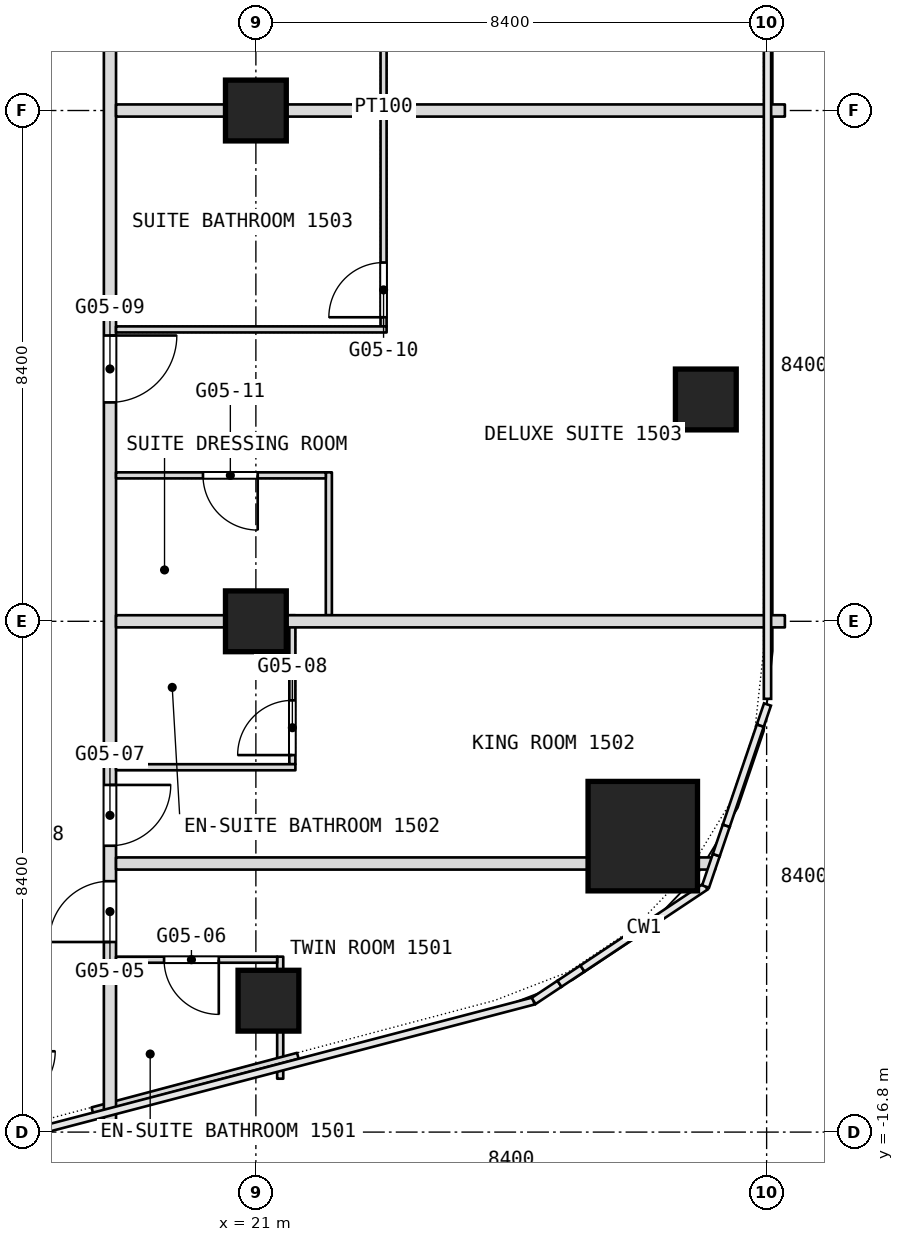
"""IFC4 building model, lengths in metres.
Left out: names, types, materials, properties, quantities, classifications, styles, units other than length and angle.
Written with IfcOpenShell. Run it as: python <this file> out.ifc"""

import sys

from ifc_helpers import new_model, si_unit, direction, frame, frame_2d, origin, origin_2d, place, context, subcontext, project, spatial, rectangle, extrude, element, fill, save


model = new_model("IFC4")
c1 = context("Model", 3, precision=1e-05, world=origin(), true_north=direction((0.0, 1.0)))
c2 = subcontext(c1, "Body", "Model", "MODEL_VIEW")
j1 = project(units=[si_unit("LENGTHUNIT", "METRE"), si_unit("PLANEANGLEUNIT", "RADIAN")], contexts=[c1])
p1 = place(None, origin())
s1 = spatial("IfcSite", under=j1, at=p1, CompositionType="ELEMENT")
p2 = place(p1, origin())
s2 = spatial("IfcBuilding", under=s1, at=p2, CompositionType="ELEMENT")
p3 = place(p2, frame((0.0, 0.0, 68.9)))
s3 = spatial("IfcBuildingStorey", under=s2, at=p3, CompositionType="ELEMENT", Elevation=68.9)
p4 = place(p3, frame((27.363, -11.933, 0.0), z_axis=(0.0, 0.0, 1.0), x_axis=(1.0, 0.0, 0.0)))
e1 = element("IfcColumn", 1, at=p4, inside=s3, PredefinedType="COLUMN", context=c2, shape_type="SweptSolid", body=[
    extrude(rectangle(XDim=1.8, YDim=1.8, at=origin_2d()), origin(), (0.0, 0.0, 1.0), 3.6),
])
for number, where, z_axis, x_axis in (
    (2, (21.0, -8.4, 0.0), (0.0, 0.0, 1.0), (1.0, 0.0, 0.0)),
    (3, (21.0, 0.0, 0.0), (0.0, 0.0, 1.0), (1.0, 0.0, 0.0)),
    (4, (28.4, -4.752, 0.0), (0.0, 0.0, 1.0), (1.0, 0.0, 0.0)),
    (5, (21.207, -14.639, 0.0), (0.0, 0.0, 1.0), (1.0, 0.0, 0.0)),
):
    element("IfcColumn", number, at=place(p3, frame(where, z_axis=z_axis, x_axis=x_axis)), inside=s3, PredefinedType="COLUMN", context=c2, shape_type="SweptSolid", body=[
        extrude(rectangle(XDim=1.0, YDim=1.0, at=origin_2d()), origin(), (0.0, 0.0, 1.0), 3.6),
    ])
p5 = place(p3, frame((23.1, -3.55, 0.0), z_axis=(0.0, 0.0, 1.0), x_axis=(0.0, 1.0, 0.0)))
e6 = element("IfcWall", 6, at=p5, inside=s3, PredefinedType="PARTITIONING", context=c2, shape_type="SweptSolid", body=[
    extrude(rectangle(XDim=7.2, YDim=0.1, at=frame_2d((3.6, 0.0))), origin(), (0.0, 0.0, 1.0), 3.34),
])
p6 = place(p5, frame((0.15, 0.0, 0.0)))
e7 = element("IfcOpeningElement", 7, at=p6, cuts=e6, PredefinedType="OPENING", context=c2, shape_type="SweptSolid", body=[
    extrude(rectangle(XDim=0.9, YDim=2.1, at=frame_2d((0.45, 1.05))), frame((0.0, 0.05, 0.0), z_axis=(0.0, -1.0, 0.0), x_axis=(1.0, 0.0, 0.0)), (0.0, 0.0, 1.0), 0.1),
])
p7 = place(p3, frame((22.2, -8.3, 0.0), z_axis=(0.0, 0.0, 1.0), x_axis=(0.0, 1.0, 0.0)))
e8 = element("IfcWall", 8, at=p7, inside=s3, PredefinedType="PARTITIONING", context=c2, shape_type="SweptSolid", body=[
    extrude(rectangle(XDim=2.35, YDim=0.1, at=frame_2d((1.175, 0.0))), origin(), (0.0, 0.0, 1.0), 3.34),
])
p8 = place(p3, frame((21.6, -10.75, 0.0), z_axis=(0.0, 0.0, 1.0), x_axis=(0.0, 1.0, 0.0)))
e9 = element("IfcWall", 9, at=p8, inside=s3, PredefinedType="PARTITIONING", context=c2, shape_type="SweptSolid", body=[
    extrude(rectangle(XDim=2.45, YDim=0.1, at=frame_2d((1.225, 0.0))), origin(), (0.0, 0.0, 1.0), 3.34),
])
p9 = place(p8, frame((0.15, 0.0, 0.0)))
e10 = element("IfcOpeningElement", 10, at=p9, cuts=e9, PredefinedType="OPENING", context=c2, shape_type="SweptSolid", body=[
    extrude(rectangle(XDim=0.9, YDim=2.1, at=frame_2d((0.45, 1.05))), frame((0.0, 0.05, 0.0), z_axis=(0.0, -1.0, 0.0), x_axis=(1.0, 0.0, 0.0)), (0.0, 0.0, 1.0), 0.1),
])
p10 = place(p3, frame((21.4, -15.922, 0.0), z_axis=(0.0, 0.0, 1.0), x_axis=(0.0, 1.0, 0.0)))
e11 = element("IfcWall", 11, at=p10, inside=s3, PredefinedType="PARTITIONING", context=c2, shape_type="SweptSolid", body=[
    extrude(rectangle(XDim=2.007, YDim=0.1, at=frame_2d((1.003, 0.0))), origin(), (0.0, 0.0, 1.0), 3.34),
])
p11 = place(p3, frame((18.31, -16.442, 0.0), z_axis=(0.0, 0.0, 1.0), x_axis=(0.966542484633, 0.25650657964, 0.0)))
e12 = element("IfcWall", 12, at=p11, inside=s3, PredefinedType="PARTITIONING", context=c2, shape_type="SweptSolid", body=[
    extrude(rectangle(XDim=3.497, YDim=0.1, at=frame_2d((1.749, 0.0))), origin(), (0.0, 0.0, 1.0), 3.34),
])
p12 = place(p3, frame((18.6, -16.665, 0.0), z_axis=(0.0, 0.0, 1.0), x_axis=(0.0, 1.0, 0.0)))
e13 = element("IfcWall", 13, at=p12, inside=s3, PredefinedType="PARTITIONING", context=c2, shape_type="SweptSolid", body=[
    extrude(rectangle(XDim=50.205, YDim=0.2, at=frame_2d((25.103, 0.0))), origin(), (0.0, 0.0, 1.0), 3.34),
])
p13 = place(p12, frame((2.991, 0.0, 0.0)))
e14 = element("IfcOpeningElement", 14, at=p13, cuts=e13, PredefinedType="OPENING", context=c2, shape_type="SweptSolid", body=[
    extrude(rectangle(XDim=1.0, YDim=2.1, at=frame_2d((0.5, 1.05))), frame((0.0, 0.1, 0.0), z_axis=(0.0, -1.0, 0.0), x_axis=(1.0, 0.0, 0.0)), (0.0, 0.0, 1.0), 0.2),
])
p14 = place(p12, frame((4.574, 0.0, 0.0)))
e15 = element("IfcOpeningElement", 15, at=p14, cuts=e13, PredefinedType="OPENING", context=c2, shape_type="SweptSolid", body=[
    extrude(rectangle(XDim=1.0, YDim=2.1, at=frame_2d((0.5, 1.05))), frame((0.0, 0.1, 0.0), z_axis=(0.0, -1.0, 0.0), x_axis=(1.0, 0.0, 0.0)), (0.0, 0.0, 1.0), 0.2),
])
p15 = place(p12, frame((11.865, 0.0, 0.0)))
e16 = element("IfcOpeningElement", 16, at=p15, cuts=e13, PredefinedType="OPENING", context=c2, shape_type="SweptSolid", body=[
    extrude(rectangle(XDim=1.1, YDim=2.1, at=frame_2d((0.55, 1.05))), frame((0.0, 0.1, 0.0), z_axis=(0.0, -1.0, 0.0), x_axis=(1.0, 0.0, 0.0)), (0.0, 0.0, 1.0), 0.2),
])
p16 = place(p12, frame((20.365, 0.0, 0.0)))
e17 = element("IfcOpeningElement", 17, at=p16, cuts=e13, PredefinedType="OPENING", context=c2, shape_type="SweptSolid", body=[
    extrude(rectangle(XDim=1.1, YDim=2.1, at=frame_2d((0.55, 1.05))), frame((0.0, 0.1, 0.0), z_axis=(0.0, -1.0, 0.0), x_axis=(1.0, 0.0, 0.0)), (0.0, 0.0, 1.0), 0.2),
])
p17 = place(p12, frame((25.465, 0.0, 0.0)))
e18 = element("IfcOpeningElement", 18, at=p17, cuts=e13, PredefinedType="OPENING", context=c2, shape_type="SweptSolid", body=[
    extrude(rectangle(XDim=1.0, YDim=2.1, at=frame_2d((0.5, 1.05))), frame((0.0, 0.1, 0.0), z_axis=(0.0, -1.0, 0.0), x_axis=(1.0, 0.0, 0.0)), (0.0, 0.0, 1.0), 0.2),
])
p18 = place(p12, frame((32.065, 0.0, 0.0)))
e19 = element("IfcOpeningElement", 19, at=p18, cuts=e13, PredefinedType="OPENING", context=c2, shape_type="SweptSolid", body=[
    extrude(rectangle(XDim=1.0, YDim=2.1, at=frame_2d((0.5, 1.05))), frame((0.0, 0.1, 0.0), z_axis=(0.0, -1.0, 0.0), x_axis=(1.0, 0.0, 0.0)), (0.0, 0.0, 1.0), 0.2),
])
p19 = place(p12, frame((36.265, 0.0, 0.0)))
e20 = element("IfcOpeningElement", 20, at=p19, cuts=e13, PredefinedType="OPENING", context=c2, shape_type="SweptSolid", body=[
    extrude(rectangle(XDim=1.0, YDim=2.1, at=frame_2d((0.5, 1.05))), frame((0.0, 0.1, 0.0), z_axis=(0.0, -1.0, 0.0), x_axis=(1.0, 0.0, 0.0)), (0.0, 0.0, 1.0), 0.2),
])
p20 = place(p12, frame((38.065, 0.0, 0.0)))
e21 = element("IfcOpeningElement", 21, at=p20, cuts=e13, PredefinedType="OPENING", context=c2, shape_type="SweptSolid", body=[
    extrude(rectangle(XDim=1.0, YDim=2.1, at=frame_2d((0.5, 1.05))), frame((0.0, 0.1, 0.0), z_axis=(0.0, -1.0, 0.0), x_axis=(1.0, 0.0, 0.0)), (0.0, 0.0, 1.0), 0.2),
])
p21 = place(p12, frame((45.465, 0.0, 0.0)))
e22 = element("IfcOpeningElement", 22, at=p21, cuts=e13, PredefinedType="OPENING", context=c2, shape_type="SweptSolid", body=[
    extrude(rectangle(XDim=1.1, YDim=2.1, at=frame_2d((0.55, 1.05))), frame((0.0, 0.1, 0.0), z_axis=(0.0, -1.0, 0.0), x_axis=(1.0, 0.0, 0.0)), (0.0, 0.0, 1.0), 0.2),
])
p22 = place(p3, frame((18.7, -13.965, 0.0), z_axis=(0.0, 0.0, 1.0), x_axis=(1.0, 0.0, 0.0)))
e23 = element("IfcWall", 23, at=p22, inside=s3, PredefinedType="PARTITIONING", context=c2, shape_type="SweptSolid", body=[
    extrude(rectangle(XDim=2.65, YDim=0.1, at=frame_2d((1.325, 0.0))), origin(), (0.0, 0.0, 1.0), 3.34),
])
p23 = place(p22, frame((0.79, 0.0, 0.0)))
e24 = element("IfcOpeningElement", 24, at=p23, cuts=e23, PredefinedType="OPENING", context=c2, shape_type="SweptSolid", body=[
    extrude(rectangle(XDim=0.9, YDim=2.1, at=frame_2d((0.45, 1.05))), frame((0.0, 0.05, 0.0), z_axis=(0.0, -1.0, 0.0), x_axis=(1.0, 0.0, 0.0)), (0.0, 0.0, 1.0), 0.1),
])
p24 = place(p3, frame((18.7, -12.383, 0.0), z_axis=(0.0, 0.0, 1.0), x_axis=(1.0, 0.0, 0.0)))
e25 = element("IfcWall", 25, at=p24, inside=s3, PredefinedType="PARTITIONING", context=c2, shape_type="SweptSolid", body=[
    extrude(rectangle(XDim=7.763, YDim=0.2, at=frame_2d((3.881, 0.0))), origin(), (0.0, 0.0, 1.0), 3.34),
])
p25 = place(p3, frame((28.263, -12.383, 0.0), z_axis=(0.0, 0.0, 1.0), x_axis=(1.0, 0.0, 0.0)))
e26 = element("IfcWall", 26, at=p25, inside=s3, PredefinedType="PARTITIONING", context=c2, shape_type="SweptSolid", body=[
    extrude(rectangle(XDim=0.29, YDim=0.2, at=frame_2d((0.145, 0.0))), origin(), (0.0, 0.0, 1.0), 3.34),
])
p26 = place(p3, frame((18.7, -10.8, 0.0), z_axis=(0.0, 0.0, 1.0), x_axis=(1.0, 0.0, 0.0)))
e27 = element("IfcWall", 27, at=p26, inside=s3, PredefinedType="PARTITIONING", context=c2, shape_type="SweptSolid", body=[
    extrude(rectangle(XDim=2.95, YDim=0.1, at=frame_2d((1.475, 0.0))), origin(), (0.0, 0.0, 1.0), 3.34),
])
p27 = place(p3, frame((18.7, -8.4, 0.0), z_axis=(0.0, 0.0, 1.0), x_axis=(1.0, 0.0, 0.0)))
e28 = element("IfcWall", 28, at=p27, inside=s3, PredefinedType="PARTITIONING", context=c2, shape_type="SweptSolid", body=[
    extrude(rectangle(XDim=11.0, YDim=0.2, at=frame_2d((5.5, 0.0))), origin(), (0.0, 0.0, 1.0), 2.84),
])
p28 = place(p3, frame((18.7, -6.0, 0.0), z_axis=(0.0, 0.0, 1.0), x_axis=(1.0, 0.0, 0.0)))
e29 = element("IfcWall", 29, at=p28, inside=s3, PredefinedType="PARTITIONING", context=c2, shape_type="SweptSolid", body=[
    extrude(rectangle(XDim=3.45, YDim=0.1, at=frame_2d((1.725, 0.0))), origin(), (0.0, 0.0, 1.0), 3.34),
])
p29 = place(p28, frame((1.43, 0.0, 0.0)))
e30 = element("IfcOpeningElement", 30, at=p29, cuts=e29, PredefinedType="OPENING", context=c2, shape_type="SweptSolid", body=[
    extrude(rectangle(XDim=0.9, YDim=2.1, at=frame_2d((0.45, 1.05))), frame((0.0, 0.05, 0.0), z_axis=(0.0, -1.0, 0.0), x_axis=(1.0, 0.0, 0.0)), (0.0, 0.0, 1.0), 0.1),
])
p30 = place(p3, frame((18.7, -3.6, 0.0), z_axis=(0.0, 0.0, 1.0), x_axis=(1.0, 0.0, 0.0)))
e31 = element("IfcWall", 31, at=p30, inside=s3, PredefinedType="PARTITIONING", context=c2, shape_type="SweptSolid", body=[
    extrude(rectangle(XDim=4.45, YDim=0.1, at=frame_2d((2.225, 0.0))), origin(), (0.0, 0.0, 1.0), 3.34),
])
p31 = place(p3, frame((18.7, 0.0, 0.0), z_axis=(0.0, 0.0, 1.0), x_axis=(1.0, 0.0, 0.0)))
e32 = element("IfcWall", 32, at=p31, inside=s3, PredefinedType="PARTITIONING", context=c2, shape_type="SweptSolid", body=[
    extrude(rectangle(XDim=11.0, YDim=0.2, at=frame_2d((5.5, 0.0))), origin(), (0.0, 0.0, 1.0), 2.84),
])
p32 = place(p6, origin())
e33 = element("IfcDoor", 33, at=p32, inside=s3, OperationType="SINGLE_SWING_LEFT", PredefinedType="DOOR", context=c2, shape_type="SweptSolid", body=[
    extrude(rectangle(XDim=0.9, YDim=2.1, at=frame_2d((0.45, 1.05))), frame((0.0, 0.025, 0.0), z_axis=(0.0, -1.0, 0.0), x_axis=(1.0, 0.0, 0.0)), (0.0, 0.0, 1.0), 0.05),
])
fill(e7, e33)
p33 = place(p9, origin())
e34 = element("IfcDoor", 34, at=p33, inside=s3, OperationType="SINGLE_SWING_LEFT", PredefinedType="DOOR", context=c2, shape_type="SweptSolid", body=[
    extrude(rectangle(XDim=0.9, YDim=2.1, at=frame_2d((0.45, 1.05))), frame((0.0, 0.025, 0.0), z_axis=(0.0, -1.0, 0.0), x_axis=(1.0, 0.0, 0.0)), (0.0, 0.0, 1.0), 0.05),
])
fill(e10, e34)
p34 = place(p13, origin())
e35 = element("IfcDoor", 35, at=p34, inside=s3, OperationType="SINGLE_SWING_LEFT", PredefinedType="DOOR", context=c2, shape_type="SweptSolid", body=[
    extrude(rectangle(XDim=1.0, YDim=2.1, at=frame_2d((0.5, 1.05))), frame((0.0, 0.025, 0.0), z_axis=(0.0, -1.0, 0.0), x_axis=(1.0, 0.0, 0.0)), (0.0, 0.0, 1.0), 0.05),
])
fill(e14, e35)
p35 = place(p14, origin())
e36 = element("IfcDoor", 36, at=p35, inside=s3, OperationType="SINGLE_SWING_LEFT", PredefinedType="DOOR", context=c2, shape_type="SweptSolid", body=[
    extrude(rectangle(XDim=1.0, YDim=2.1, at=frame_2d((0.5, 1.05))), frame((0.0, 0.025, 0.0), z_axis=(0.0, -1.0, 0.0), x_axis=(1.0, 0.0, 0.0)), (0.0, 0.0, 1.0), 0.05),
])
fill(e15, e36)
p36 = place(p15, origin())
e37 = element("IfcDoor", 37, at=p36, inside=s3, OperationType="SINGLE_SWING_LEFT", PredefinedType="DOOR", context=c2, shape_type="SweptSolid", body=[
    extrude(rectangle(XDim=1.1, YDim=2.1, at=frame_2d((0.55, 1.05))), frame((0.0, 0.025, 0.0), z_axis=(0.0, -1.0, 0.0), x_axis=(1.0, 0.0, 0.0)), (0.0, 0.0, 1.0), 0.05),
])
fill(e16, e37)
p37 = place(p23, origin())
e38 = element("IfcDoor", 38, at=p37, inside=s3, OperationType="SINGLE_SWING_LEFT", PredefinedType="DOOR", context=c2, shape_type="SweptSolid", body=[
    extrude(rectangle(XDim=0.9, YDim=2.1, at=frame_2d((0.45, 1.05))), frame((0.0, 0.025, 0.0), z_axis=(0.0, -1.0, 0.0), x_axis=(1.0, 0.0, 0.0)), (0.0, 0.0, 1.0), 0.05),
])
fill(e24, e38)
p38 = place(p29, origin())
e39 = element("IfcDoor", 39, at=p38, inside=s3, OperationType="SINGLE_SWING_LEFT", PredefinedType="DOOR", context=c2, shape_type="SweptSolid", body=[
    extrude(rectangle(XDim=0.9, YDim=2.1, at=frame_2d((0.45, 1.05))), frame((0.0, 0.025, 0.0), z_axis=(0.0, -1.0, 0.0), x_axis=(1.0, 0.0, 0.0)), (0.0, 0.0, 1.0), 0.05),
])
fill(e30, e39)
save(model, sys.argv[1])
